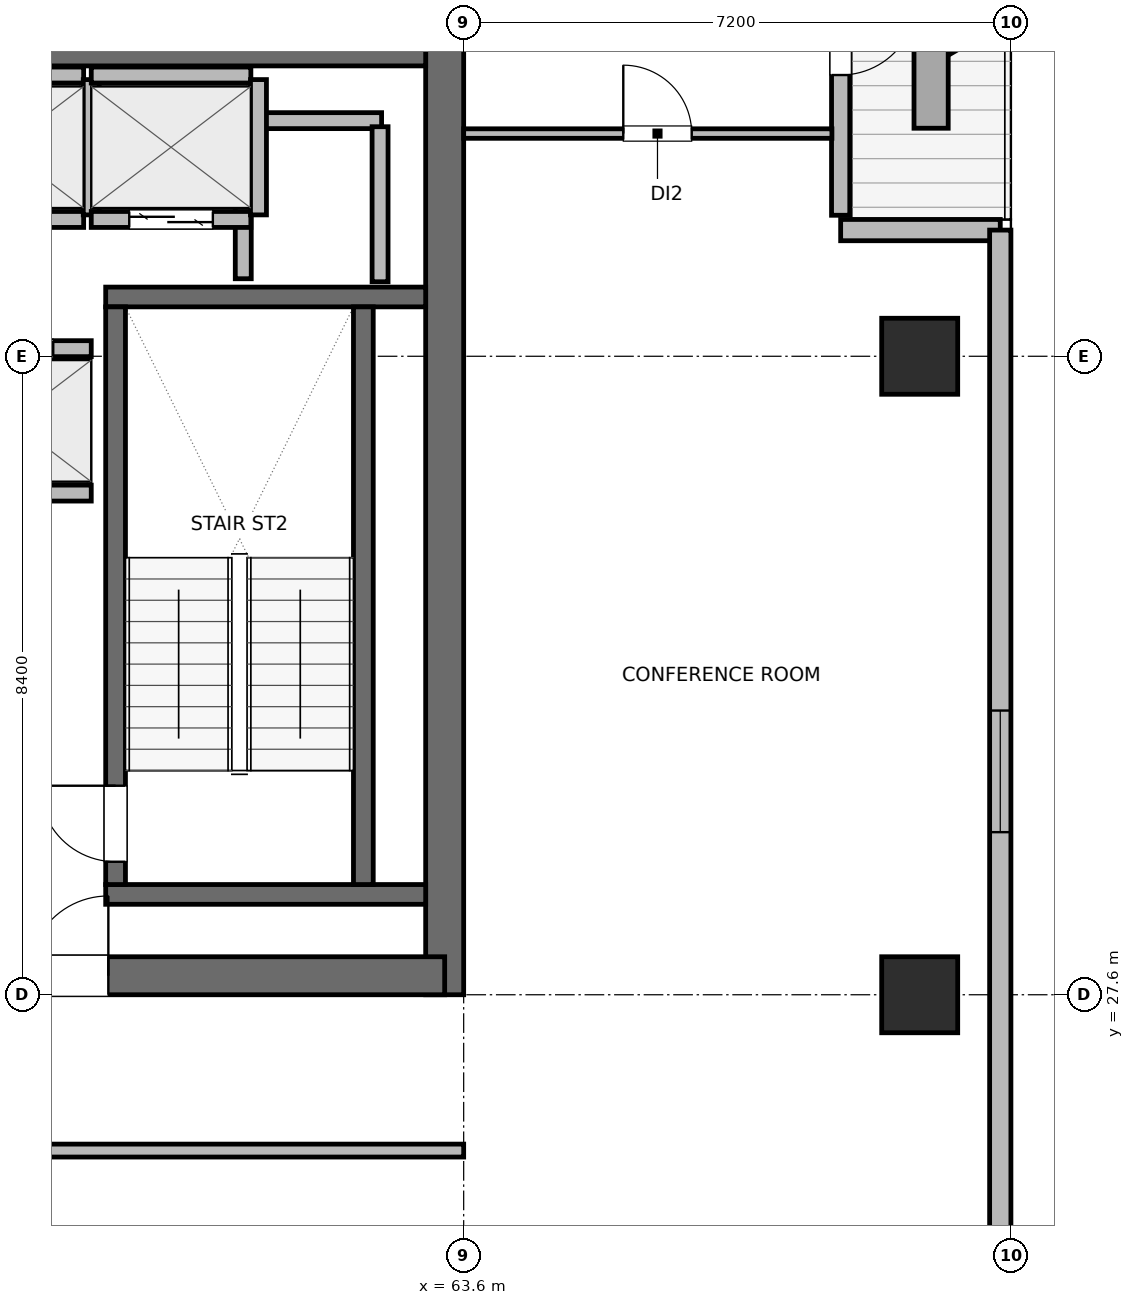
"""IFC4 building model, lengths in metres.
Left out: names, types, materials, properties, quantities, classifications, styles, units other than length and angle.
Written with IfcOpenShell. Run it as: python <this file> out.ifc"""

import sys

from ifc_helpers import new_model, si_unit, direction, frame, frame_2d, origin, origin_2d, place, context, subcontext, project, spatial, rectangle, extrude, element, fill, save


model = new_model("IFC4")
c1 = context("Model", 3, precision=1e-05, world=origin(), true_north=direction((0.0, 1.0)))
c2 = subcontext(c1, "Body", "Model", "MODEL_VIEW")
j1 = project(units=[si_unit("LENGTHUNIT", "METRE"), si_unit("PLANEANGLEUNIT", "RADIAN")], contexts=[c1])
p1 = place(None, origin())
s1 = spatial("IfcSite", under=j1, at=p1, CompositionType="ELEMENT")
p2 = place(p1, origin())
s2 = spatial("IfcBuilding", under=s1, at=p2, CompositionType="ELEMENT")
p3 = place(p2, frame((0.0, 0.0, 270.6)))
s3 = spatial("IfcBuildingStorey", under=s2, at=p3, CompositionType="ELEMENT", Elevation=270.6)
p4 = place(p3, frame((63.35, 27.6, 0.0), z_axis=(0.0, 0.0, 1.0), x_axis=(0.0, 1.0, 0.0)))
e1 = element("IfcWall", 1, at=p4, inside=s3, PredefinedType="SHEAR", context=c2, shape_type="SweptSolid", body=[
    extrude(rectangle(XDim=16.8, YDim=0.5, at=frame_2d((8.4, 0.0))), origin(), (0.0, 0.0, 1.0), 3.9),
])
p5 = place(p3, frame((53.85, 27.85, 0.0), z_axis=(0.0, 0.0, 1.0), x_axis=(1.0, 0.0, 0.0)))
e2 = element("IfcWall", 2, at=p5, inside=s3, PredefinedType="SHEAR", context=c2, shape_type="SweptSolid", body=[
    extrude(rectangle(XDim=9.5, YDim=0.5, at=frame_2d((4.75, 0.0))), origin(), (0.0, 0.0, 1.0), 3.9),
])
p6 = place(p5, frame((4.025, 0.0, 0.0)))
e3 = element("IfcOpeningElement", 3, at=p6, cuts=e2, PredefinedType="OPENING", context=c2, shape_type="SweptSolid", body=[
    extrude(rectangle(XDim=1.05, YDim=2.04, at=frame_2d((0.525, 1.02))), frame((0.0, 0.26, 0.0), z_axis=(0.0, -1.0, 0.0), x_axis=(1.0, 0.0, 0.0)), (0.0, 0.0, 1.0), 0.52),
])
for number, where, z_axis, x_axis in (
    (4, (58.89, 28.92, 0.0), (0.0, 0.0, 1.0), (1.0, 0.0, 0.0)),
    (5, (58.89, 36.78, 0.0), (0.0, 0.0, 1.0), (1.0, 0.0, 0.0)),
):
    element("IfcWall", number, at=place(p3, frame(where, z_axis=z_axis, x_axis=x_axis)), inside=s3, PredefinedType="SHEAR", context=c2, shape_type="SweptSolid", body=[
        extrude(rectangle(XDim=4.21, YDim=0.26, at=frame_2d((2.105, 0.0))), origin(), (0.0, 0.0, 1.0), 3.9),
    ])
p7 = place(p3, frame((59.02, 29.05, 0.0), z_axis=(0.0, 0.0, 1.0), x_axis=(0.0, 1.0, 0.0)))
e6 = element("IfcWall", 6, at=p7, inside=s3, PredefinedType="SHEAR", context=c2, shape_type="SweptSolid", body=[
    extrude(rectangle(XDim=7.6, YDim=0.26, at=frame_2d((3.8, 0.0))), origin(), (0.0, 0.0, 1.0), 3.9),
])
p8 = place(p7, frame((0.3, 0.0, 0.0)))
e7 = element("IfcOpeningElement", 7, at=p8, cuts=e6, PredefinedType="OPENING", context=c2, shape_type="SweptSolid", body=[
    extrude(rectangle(XDim=1.0, YDim=2.04, at=frame_2d((0.5, 1.02))), frame((0.0, 0.14, 0.0), z_axis=(0.0, -1.0, 0.0), x_axis=(1.0, 0.0, 0.0)), (0.0, 0.0, 1.0), 0.28),
])
p9 = place(p3, frame((62.28, 29.05, 0.0), z_axis=(0.0, 0.0, 1.0), x_axis=(0.0, 1.0, 0.0)))
e8 = element("IfcWall", 8, at=p9, inside=s3, PredefinedType="SHEAR", context=c2, shape_type="SweptSolid", body=[
    extrude(rectangle(XDim=7.6, YDim=0.26, at=frame_2d((3.8, 0.0))), origin(), (0.0, 0.0, 1.0), 3.9),
])
p10 = place(p3, frame((54.1, 39.95, 0.0), z_axis=(0.0, 0.0, 1.0), x_axis=(1.0, 0.0, 0.0)))
e9 = element("IfcWall", 9, at=p10, inside=s3, PredefinedType="SHEAR", context=c2, shape_type="SweptSolid", body=[
    extrude(rectangle(XDim=9.0, YDim=0.26, at=frame_2d((4.5, 0.0))), origin(), (0.0, 0.0, 1.0), 3.9),
])
p11 = place(p10, frame((1.1, 0.0, 0.0)))
e10 = element("IfcOpeningElement", 10, at=p11, cuts=e9, PredefinedType="OPENING", context=c2, shape_type="SweptSolid", body=[
    extrude(rectangle(XDim=1.0, YDim=2.04, at=frame_2d((0.5, 1.02))), frame((0.0, 0.14, 0.0), z_axis=(0.0, -1.0, 0.0), x_axis=(1.0, 0.0, 0.0)), (0.0, 0.0, 1.0), 0.28),
])
for number, where, z_axis, x_axis in (
    (11, (69.6, 27.6, 0.0), (0.0, 0.0, 1.0), (1.0, 0.0, 0.0)),
    (12, (69.6, 36.0, 0.0), (0.0, 0.0, 1.0), (1.0, 0.0, 0.0)),
):
    element("IfcColumn", number, at=place(p3, frame(where, z_axis=z_axis, x_axis=x_axis)), inside=s3, PredefinedType="COLUMN", context=c2, shape_type="SweptSolid", body=[
        extrude(rectangle(XDim=1.0, YDim=1.0, at=origin_2d()), origin(), (0.0, 0.0, 1.0), 3.9),
    ])
p12 = place(p3, frame((68.56, 42.545, 0.0), z_axis=(0.0, 0.0, 1.0), x_axis=(0.0, -1.0, 0.0)))
e13 = element("IfcWall", 13, at=p12, inside=s3, PredefinedType="SOLIDWALL", context=c2, shape_type="SweptSolid", body=[
    extrude(rectangle(XDim=4.69, YDim=0.24, at=frame_2d((2.345, 0.0))), origin(), (0.0, 0.0, 1.0), 3.311),
])
p13 = place(p12, frame((1.845, 0.0, 0.0)))
e14 = element("IfcOpeningElement", 14, at=p13, cuts=e13, PredefinedType="OPENING", context=c2, shape_type="SweptSolid", body=[
    extrude(rectangle(XDim=1.0, YDim=2.02, at=frame_2d((0.5, 1.01))), frame((0.0, 0.13, 0.0), z_axis=(0.0, -1.0, 0.0), x_axis=(1.0, 0.0, 0.0)), (0.0, 0.0, 1.0), 0.26),
])
p14 = place(p3, frame((68.56, 37.66, 0.0), z_axis=(0.0, 0.0, 1.0), x_axis=(1.0, 0.0, 0.0)))
e15 = element("IfcWall", 15, at=p14, inside=s3, PredefinedType="SOLIDWALL", context=c2, shape_type="SweptSolid", body=[
    extrude(rectangle(XDim=2.1, YDim=0.28, at=frame_2d((1.05, 0.0))), origin(), (0.0, 0.0, 1.0), 3.126),
])
p15 = place(p3, frame((70.66, 37.66, 0.0), z_axis=(0.0, 0.0, 1.0), x_axis=(0.0, -1.0, 0.0)))
e16 = element("IfcWall", 16, at=p15, inside=s3, PredefinedType="SOLIDWALL", context=c2, shape_type="SweptSolid", body=[
    extrude(rectangle(XDim=14.241, YDim=0.28, at=frame_2d((7.121, 0.0))), origin(), (0.0, 0.0, 1.0), 3.68),
])
p16 = place(p15, frame((6.321, 0.0, 0.85)))
e17 = element("IfcOpeningElement", 17, at=p16, cuts=e16, PredefinedType="OPENING", context=c2, shape_type="SweptSolid", body=[
    extrude(rectangle(XDim=1.6, YDim=1.0, at=frame_2d((0.8, 0.5))), frame((0.0, 0.15, 0.0), z_axis=(0.0, -1.0, 0.0), x_axis=(1.0, 0.0, 0.0)), (0.0, 0.0, 1.0), 0.3),
])
p17 = place(p3, frame((60.72, 39.1, 0.0), z_axis=(0.0, 0.0, 1.0), x_axis=(1.0, 0.0, 0.0)))
e18 = element("IfcWall", 18, at=p17, inside=s3, PredefinedType="PARTITIONING", context=c2, shape_type="SweptSolid", body=[
    extrude(rectangle(XDim=1.8, YDim=0.21, at=frame_2d((0.9, 0.0))), origin(), (0.0, 0.0, 1.0), 3.68),
])
p18 = place(p3, frame((60.7, 37.02, 0.0), z_axis=(0.0, 0.0, 1.0), x_axis=(0.0, 1.0, 0.0)))
e19 = element("IfcWall", 19, at=p18, inside=s3, PredefinedType="PARTITIONING", context=c2, shape_type="SweptSolid", body=[
    extrude(rectangle(XDim=1.96, YDim=0.21, at=frame_2d((0.98, 0.0))), origin(), (0.0, 0.0, 1.0), 3.68),
])
p19 = place(p3, frame((62.5, 36.98, 0.0), z_axis=(0.0, 0.0, 1.0), x_axis=(0.0, 1.0, 0.0)))
e20 = element("IfcWall", 20, at=p19, inside=s3, PredefinedType="PARTITIONING", context=c2, shape_type="SweptSolid", body=[
    extrude(rectangle(XDim=2.04, YDim=0.21, at=frame_2d((1.02, 0.0))), origin(), (0.0, 0.0, 1.0), 3.68),
])
p20 = place(p3, frame((56.6, 36.1, 0.0), z_axis=(0.0, 0.0, 1.0), x_axis=(1.0, 0.0, 0.0)))
e21 = element("IfcWall", 21, at=p20, inside=s3, PredefinedType="PARTITIONING", context=c2, shape_type="SweptSolid", body=[
    extrude(rectangle(XDim=2.1, YDim=0.21, at=frame_2d((1.05, 0.0))), origin(), (0.0, 0.0, 1.0), 3.68),
])
p21 = place(p20, frame((0.5, 0.0, 0.0)))
e22 = element("IfcOpeningElement", 22, at=p21, cuts=e21, PredefinedType="OPENING", context=c2, shape_type="SweptSolid", body=[
    extrude(rectangle(XDim=1.1, YDim=2.04, at=frame_2d((0.55, 1.02))), frame((0.0, 0.115, 0.0), z_axis=(0.0, -1.0, 0.0), x_axis=(1.0, 0.0, 0.0)), (0.0, 0.0, 1.0), 0.23),
])
p22 = place(p3, frame((57.8, 34.2, 0.0), z_axis=(0.0, 0.0, 1.0), x_axis=(1.0, 0.0, 0.0)))
e23 = element("IfcWall", 23, at=p22, inside=s3, PredefinedType="PARTITIONING", context=c2, shape_type="SweptSolid", body=[
    extrude(rectangle(XDim=0.9, YDim=0.21, at=frame_2d((0.45, 0.0))), origin(), (0.0, 0.0, 1.0), 3.68),
])
p23 = place(p3, frame((56.5, 37.8, 0.0), z_axis=(0.0, 0.0, 1.0), x_axis=(1.0, 0.0, 0.0)))
e24 = element("IfcWall", 24, at=p23, inside=s3, PredefinedType="PARTITIONING", context=c2, shape_type="SweptSolid", body=[
    extrude(rectangle(XDim=2.1, YDim=0.21, at=frame_2d((1.05, 0.0))), origin(), (0.0, 0.0, 1.0), 3.68),
])
p24 = place(p23, frame((0.5, 0.0, 0.0)))
e25 = element("IfcOpeningElement", 25, at=p24, cuts=e24, PredefinedType="OPENING", context=c2, shape_type="SweptSolid", body=[
    extrude(rectangle(XDim=1.1, YDim=2.04, at=frame_2d((0.55, 1.02))), frame((0.0, 0.115, 0.0), z_axis=(0.0, -1.0, 0.0), x_axis=(1.0, 0.0, 0.0)), (0.0, 0.0, 1.0), 0.23),
])
p25 = place(p3, frame((56.5, 39.7, 0.0), z_axis=(0.0, 0.0, 1.0), x_axis=(1.0, 0.0, 0.0)))
e26 = element("IfcWall", 26, at=p25, inside=s3, PredefinedType="PARTITIONING", context=c2, shape_type="SweptSolid", body=[
    extrude(rectangle(XDim=2.1, YDim=0.21, at=frame_2d((1.05, 0.0))), origin(), (0.0, 0.0, 1.0), 3.68),
])
p26 = place(p3, frame((58.7, 37.86, 0.0), z_axis=(0.0, 0.0, 1.0), x_axis=(0.0, 1.0, 0.0)))
e27 = element("IfcWall", 27, at=p26, inside=s3, PredefinedType="PARTITIONING", context=c2, shape_type="SweptSolid", body=[
    extrude(rectangle(XDim=1.78, YDim=0.21, at=frame_2d((0.89, 0.0))), origin(), (0.0, 0.0, 1.0), 3.68),
])
p27 = place(p3, frame((58.7, 37.8, 0.0), z_axis=(0.0, 0.0, 1.0), x_axis=(1.0, 0.0, 0.0)))
e28 = element("IfcWall", 28, at=p27, inside=s3, PredefinedType="PARTITIONING", context=c2, shape_type="SweptSolid", body=[
    extrude(rectangle(XDim=2.1, YDim=0.21, at=frame_2d((1.05, 0.0))), origin(), (0.0, 0.0, 1.0), 3.68),
])
p28 = place(p27, frame((0.5, 0.0, 0.0)))
e29 = element("IfcOpeningElement", 29, at=p28, cuts=e28, PredefinedType="OPENING", context=c2, shape_type="SweptSolid", body=[
    extrude(rectangle(XDim=1.1, YDim=2.04, at=frame_2d((0.55, 1.02))), frame((0.0, 0.115, 0.0), z_axis=(0.0, -1.0, 0.0), x_axis=(1.0, 0.0, 0.0)), (0.0, 0.0, 1.0), 0.23),
])
p29 = place(p3, frame((58.7, 39.7, 0.0), z_axis=(0.0, 0.0, 1.0), x_axis=(1.0, 0.0, 0.0)))
e30 = element("IfcWall", 30, at=p29, inside=s3, PredefinedType="PARTITIONING", context=c2, shape_type="SweptSolid", body=[
    extrude(rectangle(XDim=2.1, YDim=0.21, at=frame_2d((1.05, 0.0))), origin(), (0.0, 0.0, 1.0), 3.68),
])
p30 = place(p3, frame((60.9, 37.86, 0.0), z_axis=(0.0, 0.0, 1.0), x_axis=(0.0, 1.0, 0.0)))
e31 = element("IfcWall", 31, at=p30, inside=s3, PredefinedType="PARTITIONING", context=c2, shape_type="SweptSolid", body=[
    extrude(rectangle(XDim=1.78, YDim=0.21, at=frame_2d((0.89, 0.0))), origin(), (0.0, 0.0, 1.0), 3.68),
])
p31 = place(p3, frame((30.35, 25.55, 0.0), z_axis=(0.0, 0.0, 1.0), x_axis=(1.0, 0.0, 0.0)))
e32 = element("IfcWall", 32, at=p31, inside=s3, PredefinedType="PARTITIONING", context=c2, shape_type="SweptSolid", body=[
    extrude(rectangle(XDim=33.25, YDim=0.17, at=frame_2d((16.625, 0.0))), origin(), (0.0, 0.0, 1.0), 3.68),
])
p32 = place(p31, frame((5.95, 0.0, 0.0)))
e33 = element("IfcOpeningElement", 33, at=p32, cuts=e32, PredefinedType="OPENING", context=c2, shape_type="SweptSolid", body=[
    extrude(rectangle(XDim=0.95, YDim=2.04, at=frame_2d((0.475, 1.02))), frame((0.0, 0.095, 0.0), z_axis=(0.0, -1.0, 0.0), x_axis=(1.0, 0.0, 0.0)), (0.0, 0.0, 1.0), 0.19),
])
p33 = place(p31, frame((22.575, 0.0, 0.0)))
e34 = element("IfcOpeningElement", 34, at=p33, cuts=e32, PredefinedType="OPENING", context=c2, shape_type="SweptSolid", body=[
    extrude(rectangle(XDim=0.95, YDim=2.04, at=frame_2d((0.475, 1.02))), frame((0.0, 0.095, 0.0), z_axis=(0.0, -1.0, 0.0), x_axis=(1.0, 0.0, 0.0)), (0.0, 0.0, 1.0), 0.19),
])
p34 = place(p3, frame((63.6, 38.93, 0.0), z_axis=(0.0, 0.0, 1.0), x_axis=(1.0, 0.0, 0.0)))
e35 = element("IfcWall", 35, at=p34, inside=s3, PredefinedType="PARTITIONING", context=c2, shape_type="SweptSolid", body=[
    extrude(rectangle(XDim=4.845, YDim=0.125, at=frame_2d((2.422, 0.0))), origin(), (0.0, 0.0, 1.0), 3.68),
])
p35 = place(p34, frame((2.1, 0.0, 0.0)))
e36 = element("IfcOpeningElement", 36, at=p35, cuts=e35, PredefinedType="OPENING", context=c2, shape_type="SweptSolid", body=[
    extrude(rectangle(XDim=0.9, YDim=2.02, at=frame_2d((0.45, 1.01))), frame((0.0, 0.073, 0.0), z_axis=(0.0, -1.0, 0.0), x_axis=(1.0, 0.0, 0.0)), (0.0, 0.0, 1.0), 0.145),
])
p36 = place(p13, origin())
e37 = element("IfcDoor", 37, at=p36, inside=s3, OperationType="SINGLE_SWING_LEFT", PredefinedType="DOOR", context=c2, shape_type="SweptSolid", body=[
    extrude(rectangle(XDim=1.0, YDim=2.02, at=frame_2d((0.5, 1.01))), frame((0.0, 0.025, 0.0), z_axis=(0.0, -1.0, 0.0), x_axis=(1.0, 0.0, 0.0)), (0.0, 0.0, 1.0), 0.05),
])
fill(e14, e37)
p37 = place(p16, origin())
e38 = element("IfcWindow", 38, at=p37, inside=s3, PartitioningType="SINGLE_PANEL", PredefinedType="WINDOW", context=c2, shape_type="SweptSolid", body=[
    extrude(rectangle(XDim=1.6, YDim=1.0, at=frame_2d((0.8, 0.5))), frame((0.0, 0.03, 0.0), z_axis=(0.0, -1.0, 0.0), x_axis=(1.0, 0.0, 0.0)), (0.0, 0.0, 1.0), 0.06),
])
fill(e17, e38)
p38 = place(p8, origin())
e39 = element("IfcDoor", 39, at=p38, inside=s3, OperationType="SINGLE_SWING_RIGHT", PredefinedType="DOOR", context=c2, shape_type="SweptSolid", body=[
    extrude(rectangle(XDim=1.0, YDim=2.04, at=frame_2d((0.5, 1.02))), frame((0.0, 0.025, 0.0), z_axis=(0.0, -1.0, 0.0), x_axis=(1.0, 0.0, 0.0)), (0.0, 0.0, 1.0), 0.05),
])
fill(e7, e39)
p39 = place(p21, origin())
e40 = element("IfcDoor", 40, at=p39, inside=s3, OperationType="DOUBLE_DOOR_SLIDING", PredefinedType="DOOR", context=c2, shape_type="SweptSolid", body=[
    extrude(rectangle(XDim=1.1, YDim=2.04, at=frame_2d((0.55, 1.02))), frame((0.0, 0.025, 0.0), z_axis=(0.0, -1.0, 0.0), x_axis=(1.0, 0.0, 0.0)), (0.0, 0.0, 1.0), 0.05),
])
fill(e22, e40)
p40 = place(p28, origin())
e41 = element("IfcDoor", 41, at=p40, inside=s3, OperationType="DOUBLE_DOOR_SLIDING", PredefinedType="DOOR", context=c2, shape_type="SweptSolid", body=[
    extrude(rectangle(XDim=1.1, YDim=2.04, at=frame_2d((0.55, 1.02))), frame((0.0, 0.025, 0.0), z_axis=(0.0, -1.0, 0.0), x_axis=(1.0, 0.0, 0.0)), (0.0, 0.0, 1.0), 0.05),
])
fill(e29, e41)
p41 = place(p6, origin())
e42 = element("IfcDoor", 42, at=p41, inside=s3, OperationType="SINGLE_SWING_RIGHT", PredefinedType="DOOR", context=c2, shape_type="SweptSolid", body=[
    extrude(rectangle(XDim=1.05, YDim=2.04, at=frame_2d((0.525, 1.02))), frame((0.0, 0.025, 0.0), z_axis=(0.0, -1.0, 0.0), x_axis=(1.0, 0.0, 0.0)), (0.0, 0.0, 1.0), 0.05),
])
fill(e3, e42)
p42 = place(p35, origin())
e43 = element("IfcDoor", 43, at=p42, inside=s3, OperationType="SINGLE_SWING_LEFT", PredefinedType="DOOR", context=c2, shape_type="SweptSolid", body=[
    extrude(rectangle(XDim=0.9, YDim=2.02, at=frame_2d((0.45, 1.01))), frame((0.0, 0.025, 0.0), z_axis=(0.0, -1.0, 0.0), x_axis=(1.0, 0.0, 0.0)), (0.0, 0.0, 1.0), 0.05),
])
fill(e36, e43)
save(model, sys.argv[1])
